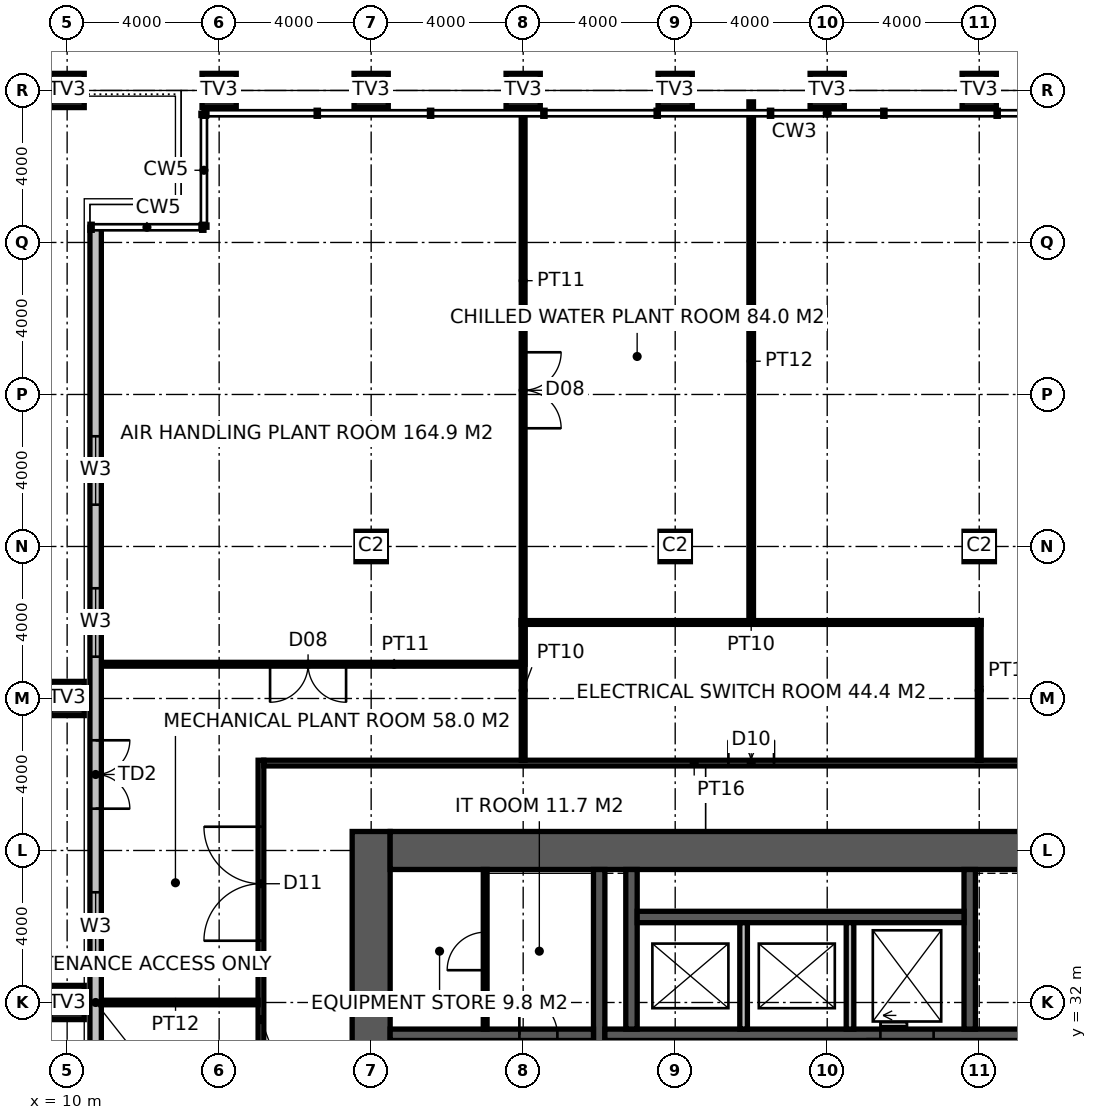
"""IFC4 building model, lengths in metres.
Left out: names, types, materials, properties, quantities, classifications, styles, units other than length and angle.
Written with IfcOpenShell. Run it as: python <this file> out.ifc"""

import sys

from ifc_helpers import new_model, si_unit, direction, frame, frame_2d, origin, origin_2d, place, context, subcontext, project, spatial, rectangle, hollow_rectangle, extrude, element, fill, save


model = new_model("IFC4")
c1 = context("Model", 3, precision=1e-05, world=origin(), true_north=direction((0.0, 1.0)))
c2 = subcontext(c1, "Body", "Model", "MODEL_VIEW")
j1 = project(units=[si_unit("LENGTHUNIT", "METRE"), si_unit("PLANEANGLEUNIT", "RADIAN")], contexts=[c1])
p1 = place(None, origin())
s1 = spatial("IfcSite", under=j1, at=p1, CompositionType="ELEMENT")
p2 = place(p1, origin())
s2 = spatial("IfcBuilding", under=s1, at=p2, CompositionType="ELEMENT")
p3 = place(p2, frame((0.0, 0.0, 203.8)))
s3 = spatial("IfcBuildingStorey", under=s2, at=p3, CompositionType="ELEMENT", Elevation=203.8)
for number, where, z_axis, x_axis in (
    (1, (10.0, 32.0, 0.0), (0.0, 0.0, 1.0), (1.0, 0.0, 0.0)),
    (2, (10.0, 40.0, 0.0), (0.0, 0.0, 1.0), (1.0, 0.0, 0.0)),
    (3, (10.0, 56.0, 0.0), (0.0, 0.0, 1.0), (1.0, 0.0, 0.0)),
    (4, (14.0, 56.0, 0.0), (0.0, 0.0, 1.0), (1.0, 0.0, 0.0)),
    (5, (18.0, 56.0, 0.0), (0.0, 0.0, 1.0), (1.0, 0.0, 0.0)),
    (6, (22.0, 56.0, 0.0), (0.0, 0.0, 1.0), (1.0, 0.0, 0.0)),
    (7, (26.0, 56.0, 0.0), (0.0, 0.0, 1.0), (1.0, 0.0, 0.0)),
    (8, (30.0, 56.0, 0.0), (0.0, 0.0, 1.0), (1.0, 0.0, 0.0)),
    (9, (34.0, 56.0, 0.0), (0.0, 0.0, 1.0), (1.0, 0.0, 0.0)),
):
    element("IfcColumn", number, at=place(p3, frame(where, z_axis=z_axis, x_axis=x_axis)), inside=s3, PredefinedType="USERDEFINED", context=c2, shape_type="SweptSolid", body=[
        extrude(hollow_rectangle(XDim=0.9, YDim=0.9, WallThickness=0.08, at=origin_2d()), origin(), (0.0, 0.0, 1.0), 5.4),
    ])
for number, where, z_axis, x_axis in (
    (10, (18.0, 44.0, 0.0), (0.0, 0.0, 1.0), (1.0, 0.0, 0.0)),
    (11, (26.0, 44.0, 0.0), (0.0, 0.0, 1.0), (1.0, 0.0, 0.0)),
    (12, (34.0, 44.0, 0.0), (0.0, 0.0, 1.0), (1.0, 0.0, 0.0)),
):
    element("IfcColumn", number, at=place(p3, frame(where, z_axis=z_axis, x_axis=x_axis)), inside=s3, PredefinedType="COLUMN", context=c2, shape_type="SweptSolid", body=[
        extrude(hollow_rectangle(XDim=0.8, YDim=0.8, WallThickness=0.08, at=origin_2d()), origin(), (0.0, 0.0, 1.0), 5.4),
    ])
p4 = place(p3, frame((18.0, 17.5, -0.15), z_axis=(0.0, 0.0, 1.0), x_axis=(0.0, 1.0, 0.0)))
e13 = element("IfcWall", 13, at=p4, inside=s3, PredefinedType="SHEAR", context=c2, shape_type="SweptSolid", body=[
    extrude(rectangle(XDim=19.0, YDim=1.0, at=frame_2d((9.5, 0.0))), origin(), (0.0, 0.0, 1.0), 5.4),
])
p5 = place(p3, frame((18.5, 36.0, -0.15), z_axis=(0.0, 0.0, 1.0), x_axis=(1.0, 0.0, 0.0)))
e14 = element("IfcWall", 14, at=p5, inside=s3, PredefinedType="SHEAR", context=c2, shape_type="SweptSolid", body=[
    extrude(rectangle(XDim=17.6, YDim=1.0, at=frame_2d((8.8, 0.0))), origin(), (0.0, 0.0, 1.0), 5.4),
])
p6 = place(p3, frame((24.0, 18.5, -0.15), z_axis=(0.0, 0.0, 1.0), x_axis=(0.0, 1.0, 0.0)))
e15 = element("IfcWall", 15, at=p6, inside=s3, PredefinedType="SHEAR", context=c2, shape_type="SweptSolid", body=[
    extrude(rectangle(XDim=17.0, YDim=0.3, at=frame_2d((8.5, 0.0))), origin(), (0.0, 0.0, 1.0), 5.4),
])
p7 = place(p6, frame((9.6, 0.0, 0.15)))
e16 = element("IfcOpeningElement", 16, at=p7, cuts=e15, PredefinedType="OPENING", context=c2, shape_type="SweptSolid", body=[
    extrude(rectangle(XDim=1.5, YDim=2.4, at=frame_2d((0.75, 1.2))), frame((0.0, 0.16, 0.0), z_axis=(0.0, -1.0, 0.0), x_axis=(1.0, 0.0, 0.0)), (0.0, 0.0, 1.0), 0.32),
])
p8 = place(p3, frame((24.15, 31.15, -0.15), z_axis=(0.0, 0.0, 1.0), x_axis=(1.0, 0.0, 0.0)))
e17 = element("IfcWall", 17, at=p8, inside=s3, PredefinedType="SHEAR", context=c2, shape_type="SweptSolid", body=[
    extrude(rectangle(XDim=11.25, YDim=0.3, at=frame_2d((5.625, 0.0))), origin(), (0.0, 0.0, 1.0), 5.4),
])
p9 = place(p8, frame((7.25, 0.0, 0.15)))
e18 = element("IfcOpeningElement", 18, at=p9, cuts=e17, PredefinedType="OPENING", context=c2, shape_type="SweptSolid", body=[
    extrude(rectangle(XDim=1.4, YDim=2.4, at=frame_2d((0.7, 1.2))), frame((0.0, 0.16, 0.0), z_axis=(0.0, -1.0, 0.0), x_axis=(1.0, 0.0, 0.0)), (0.0, 0.0, 1.0), 0.32),
])
p10 = place(p3, frame((18.5, 31.15, -0.15), z_axis=(0.0, 0.0, 1.0), x_axis=(1.0, 0.0, 0.0)))
e19 = element("IfcWall", 19, at=p10, inside=s3, PredefinedType="SHEAR", context=c2, shape_type="SweptSolid", body=[
    extrude(rectangle(XDim=5.35, YDim=0.3, at=frame_2d((2.675, 0.0))), origin(), (0.0, 0.0, 1.0), 5.4),
])
p11 = place(p10, frame((3.4, 0.0, 0.15)))
e20 = element("IfcOpeningElement", 20, at=p11, cuts=e19, PredefinedType="OPENING", context=c2, shape_type="SweptSolid", body=[
    extrude(rectangle(XDim=1.0, YDim=2.2, at=frame_2d((0.5, 1.1))), frame((0.0, 0.16, 0.0), z_axis=(0.0, -1.0, 0.0), x_axis=(1.0, 0.0, 0.0)), (0.0, 0.0, 1.0), 0.32),
])
for number, where, z_axis, x_axis in (
    (21, (24.85, 31.3, -0.15), (0.0, 0.0, 1.0), (0.0, 1.0, 0.0)),
    (22, (33.75, 31.3, -0.15), (0.0, 0.0, 1.0), (0.0, 1.0, 0.0)),
):
    element("IfcWall", number, at=place(p3, frame(where, z_axis=z_axis, x_axis=x_axis)), inside=s3, PredefinedType="SHEAR", context=c2, shape_type="SweptSolid", body=[
        extrude(rectangle(XDim=4.2, YDim=0.3, at=frame_2d((2.1, 0.0))), origin(), (0.0, 0.0, 1.0), 5.4),
    ])
p12 = place(p3, frame((25.0, 34.25, -0.15), z_axis=(0.0, 0.0, 1.0), x_axis=(1.0, 0.0, 0.0)))
e23 = element("IfcWall", 23, at=p12, inside=s3, PredefinedType="SHEAR", context=c2, shape_type="SweptSolid", body=[
    extrude(rectangle(XDim=8.6, YDim=0.3, at=frame_2d((4.3, 0.0))), origin(), (0.0, 0.0, 1.0), 5.4),
])
for number, where, z_axis, x_axis in (
    (24, (27.8, 31.3, -0.15), (0.0, 0.0, 1.0), (0.0, 1.0, 0.0)),
    (25, (30.6, 31.3, -0.15), (0.0, 0.0, 1.0), (0.0, 1.0, 0.0)),
):
    element("IfcWall", number, at=place(p3, frame(where, z_axis=z_axis, x_axis=x_axis)), inside=s3, PredefinedType="SOLIDWALL", context=c2, shape_type="SweptSolid", body=[
        extrude(rectangle(XDim=2.8, YDim=0.2, at=frame_2d((1.4, 0.0))), origin(), (0.0, 0.0, 1.0), 5.4),
    ])
p13 = place(p3, frame((21.0, 31.3, 0.0), z_axis=(0.0, 0.0, 1.0), x_axis=(0.0, 1.0, 0.0)))
e26 = element("IfcWall", 26, at=p13, inside=s3, PredefinedType="PARTITIONING", context=c2, shape_type="SweptSolid", body=[
    extrude(rectangle(XDim=4.2, YDim=0.1, at=frame_2d((2.1, 0.0))), origin(), (0.0, 0.0, 1.0), 5.25),
])
p14 = place(p13, frame((1.55, 0.0, 0.0)))
e27 = element("IfcOpeningElement", 27, at=p14, cuts=e26, PredefinedType="OPENING", context=c2, shape_type="SweptSolid", body=[
    extrude(rectangle(XDim=1.0, YDim=2.2, at=frame_2d((0.5, 1.1))), frame((0.0, 0.06, 0.0), z_axis=(0.0, -1.0, 0.0), x_axis=(1.0, 0.0, 0.0)), (0.0, 0.0, 1.0), 0.12),
])
p15 = place(p3, frame((15.1, 15.625, 0.0), z_axis=(0.0, 0.0, 1.0), x_axis=(0.0, 1.0, 0.0)))
e28 = element("IfcWall", 28, at=p15, inside=s3, PredefinedType="PARTITIONING", context=c2, shape_type="SweptSolid", body=[
    extrude(rectangle(XDim=22.75, YDim=0.15, at=frame_2d((11.375, 0.0))), origin(), (0.0, 0.0, 1.0), 5.25),
])
p16 = place(p15, frame((5.849, 0.0, 0.0)))
e29 = element("IfcOpeningElement", 29, at=p16, cuts=e28, PredefinedType="OPENING", context=c2, shape_type="SweptSolid", body=[
    extrude(rectangle(XDim=2.0, YDim=2.4, at=frame_2d((1.0, 1.2))), frame((0.0, 0.085, 0.0), z_axis=(0.0, -1.0, 0.0), x_axis=(1.0, 0.0, 0.0)), (0.0, 0.0, 1.0), 0.17),
])
p17 = place(p15, frame((18.0, 0.0, 0.0)))
e30 = element("IfcOpeningElement", 30, at=p17, cuts=e28, PredefinedType="OPENING", context=c2, shape_type="SweptSolid", body=[
    extrude(rectangle(XDim=3.0, YDim=3.3, at=frame_2d((1.5, 1.65))), frame((0.0, 0.085, 0.0), z_axis=(0.0, -1.0, 0.0), x_axis=(1.0, 0.0, 0.0)), (0.0, 0.0, 1.0), 0.17),
])
p18 = place(p3, frame((15.175, 38.3, 0.0), z_axis=(0.0, 0.0, 1.0), x_axis=(1.0, 0.0, 0.0)))
e31 = element("IfcWall", 31, at=p18, inside=s3, PredefinedType="PARTITIONING", context=c2, shape_type="SweptSolid", body=[
    extrude(rectangle(XDim=22.65, YDim=0.15, at=frame_2d((11.325, 0.0))), origin(), (0.0, 0.0, 1.0), 5.25),
])
p19 = place(p18, frame((12.225, 0.0, 0.0)))
e32 = element("IfcOpeningElement", 32, at=p19, cuts=e31, PredefinedType="OPENING", context=c2, shape_type="SweptSolid", body=[
    extrude(rectangle(XDim=1.2, YDim=2.2, at=frame_2d((0.6, 1.1))), frame((0.0, 0.085, 0.0), z_axis=(0.0, -1.0, 0.0), x_axis=(1.0, 0.0, 0.0)), (0.0, 0.0, 1.0), 0.17),
])
for number, where, z_axis, x_axis in (
    (33, (22.0, 38.375, 0.0), (0.0, 0.0, 1.0), (0.0, 1.0, 0.0)),
    (34, (34.0, 38.375, 0.0), (0.0, 0.0, 1.0), (0.0, 1.0, 0.0)),
):
    element("IfcWall", number, at=place(p3, frame(where, z_axis=z_axis, x_axis=x_axis)), inside=s3, PredefinedType="PARTITIONING", context=c2, shape_type="SweptSolid", body=[
        extrude(rectangle(XDim=3.675, YDim=0.1, at=frame_2d((1.837, 0.0))), origin(), (0.0, 0.0, 1.0), 4.25),
    ])
p20 = place(p3, frame((21.95, 42.0, 0.0), z_axis=(0.0, 0.0, 1.0), x_axis=(1.0, 0.0, 0.0)))
e35 = element("IfcWall", 35, at=p20, inside=s3, PredefinedType="PARTITIONING", context=c2, shape_type="SweptSolid", body=[
    extrude(rectangle(XDim=12.1, YDim=0.1, at=frame_2d((6.05, 0.0))), origin(), (0.0, 0.0, 1.0), 5.25),
])
p21 = place(p3, frame((28.0, 42.05, 0.0), z_axis=(0.0, 0.0, 1.0), x_axis=(0.0, 1.0, 0.0)))
e36 = element("IfcWall", 36, at=p21, inside=s3, PredefinedType="PARTITIONING", context=c2, shape_type="SweptSolid", body=[
    extrude(rectangle(XDim=13.65, YDim=0.12, at=frame_2d((6.825, 0.0))), origin(), (0.0, 0.0, 1.0), 5.25),
])
p22 = place(p3, frame((10.68, 32.0, 0.0), z_axis=(0.0, 0.0, 1.0), x_axis=(1.0, 0.0, 0.0)))
e37 = element("IfcWall", 37, at=p22, inside=s3, PredefinedType="PARTITIONING", context=c2, shape_type="SweptSolid", body=[
    extrude(rectangle(XDim=4.345, YDim=0.12, at=frame_2d((2.172, 0.0))), origin(), (0.0, 0.0, 1.0), 4.05),
])
p23 = place(p3, frame((22.0, 40.901, 0.0), z_axis=(0.0, 0.0, 1.0), x_axis=(-1.0, 0.0, 0.0)))
e38 = element("IfcWall", 38, at=p23, inside=s3, PredefinedType="PARTITIONING", context=c2, shape_type="SweptSolid", body=[
    extrude(rectangle(XDim=11.32, YDim=0.1, at=frame_2d((5.66, 0.0))), origin(), (0.0, 0.0, 1.0), 5.25),
])
p24 = place(p23, frame((4.66, 0.0, 0.0)))
e39 = element("IfcOpeningElement", 39, at=p24, cuts=e38, PredefinedType="OPENING", context=c2, shape_type="SweptSolid", body=[
    extrude(rectangle(XDim=2.0, YDim=2.4, at=frame_2d((1.0, 1.2))), frame((0.0, 0.06, 0.0), z_axis=(0.0, -1.0, 0.0), x_axis=(1.0, 0.0, 0.0)), (0.0, 0.0, 1.0), 0.12),
])
p25 = place(p3, frame((21.999, 55.32, 0.0), z_axis=(0.0, 0.0, 1.0), x_axis=(0.0, -1.0, 0.0)))
e40 = element("IfcWall", 40, at=p25, inside=s3, PredefinedType="PARTITIONING", context=c2, shape_type="SweptSolid", body=[
    extrude(rectangle(XDim=14.419, YDim=0.1, at=frame_2d((7.209, 0.0))), origin(), (0.0, 0.0, 1.0), 4.25),
])
p26 = place(p25, frame((6.209, 0.0, 0.0)))
e41 = element("IfcOpeningElement", 41, at=p26, cuts=e40, PredefinedType="OPENING", context=c2, shape_type="SweptSolid", body=[
    extrude(rectangle(XDim=2.0, YDim=2.4, at=frame_2d((1.0, 1.2))), frame((0.0, 0.06, 0.0), z_axis=(0.0, -1.0, 0.0), x_axis=(1.0, 0.0, 0.0)), (0.0, 0.0, 1.0), 0.12),
])
p27 = place(p3, frame((10.75, 52.4, 0.0), z_axis=(0.0, 0.0, 1.0), x_axis=(0.0, -1.0, 0.0)))
e42 = element("IfcWall", 42, at=p27, inside=s3, PredefinedType="ELEMENTEDWALL", context=c2, shape_type="SweptSolid", body=[
    extrude(rectangle(XDim=40.8, YDim=0.3, at=frame_2d((20.4, 0.0))), origin(), (0.0, 0.0, 1.0), 5.25),
])
p28 = place(p27, frame((33.5, 0.0, 0.8)))
e43 = element("IfcOpeningElement", 43, at=p28, cuts=e42, PredefinedType="OPENING", context=c2, shape_type="SweptSolid", body=[
    extrude(rectangle(XDim=1.8, YDim=2.4, at=frame_2d((0.9, 1.2))), frame((0.0, 0.16, 0.0), z_axis=(0.0, -1.0, 0.0), x_axis=(1.0, 0.0, 0.0)), (0.0, 0.0, 1.0), 0.32),
])
p29 = place(p27, frame((29.5, 0.0, 0.8)))
e44 = element("IfcOpeningElement", 44, at=p29, cuts=e42, PredefinedType="OPENING", context=c2, shape_type="SweptSolid", body=[
    extrude(rectangle(XDim=1.8, YDim=2.4, at=frame_2d((0.9, 1.2))), frame((0.0, 0.16, 0.0), z_axis=(0.0, -1.0, 0.0), x_axis=(1.0, 0.0, 0.0)), (0.0, 0.0, 1.0), 0.32),
])
p30 = place(p27, frame((25.5, 0.0, 0.8)))
e45 = element("IfcOpeningElement", 45, at=p30, cuts=e42, PredefinedType="OPENING", context=c2, shape_type="SweptSolid", body=[
    extrude(rectangle(XDim=1.8, YDim=2.4, at=frame_2d((0.9, 1.2))), frame((0.0, 0.16, 0.0), z_axis=(0.0, -1.0, 0.0), x_axis=(1.0, 0.0, 0.0)), (0.0, 0.0, 1.0), 0.32),
])
p31 = place(p27, frame((21.5, 0.0, 0.8)))
e46 = element("IfcOpeningElement", 46, at=p31, cuts=e42, PredefinedType="OPENING", context=c2, shape_type="SweptSolid", body=[
    extrude(rectangle(XDim=1.8, YDim=2.4, at=frame_2d((0.9, 1.2))), frame((0.0, 0.16, 0.0), z_axis=(0.0, -1.0, 0.0), x_axis=(1.0, 0.0, 0.0)), (0.0, 0.0, 1.0), 0.32),
])
p32 = place(p27, frame((17.5, 0.0, 0.8)))
e47 = element("IfcOpeningElement", 47, at=p32, cuts=e42, PredefinedType="OPENING", context=c2, shape_type="SweptSolid", body=[
    extrude(rectangle(XDim=1.8, YDim=2.4, at=frame_2d((0.9, 1.2))), frame((0.0, 0.16, 0.0), z_axis=(0.0, -1.0, 0.0), x_axis=(1.0, 0.0, 0.0)), (0.0, 0.0, 1.0), 0.32),
])
p33 = place(p27, frame((13.5, 0.0, 0.0)))
e48 = element("IfcOpeningElement", 48, at=p33, cuts=e42, PredefinedType="OPENING", context=c2, shape_type="SweptSolid", body=[
    extrude(rectangle(XDim=1.8, YDim=2.4, at=frame_2d((0.9, 1.2))), frame((0.0, 0.16, 0.0), z_axis=(0.0, -1.0, 0.0), x_axis=(1.0, 0.0, 0.0)), (0.0, 0.0, 1.0), 0.32),
])
p34 = place(p27, frame((9.5, 0.0, 0.8)))
e49 = element("IfcOpeningElement", 49, at=p34, cuts=e42, PredefinedType="OPENING", context=c2, shape_type="SweptSolid", body=[
    extrude(rectangle(XDim=1.8, YDim=2.4, at=frame_2d((0.9, 1.2))), frame((0.0, 0.16, 0.0), z_axis=(0.0, -1.0, 0.0), x_axis=(1.0, 0.0, 0.0)), (0.0, 0.0, 1.0), 0.32),
])
p35 = place(p27, frame((5.5, 0.0, 0.8)))
e50 = element("IfcOpeningElement", 50, at=p35, cuts=e42, PredefinedType="OPENING", context=c2, shape_type="SweptSolid", body=[
    extrude(rectangle(XDim=1.8, YDim=2.4, at=frame_2d((0.9, 1.2))), frame((0.0, 0.16, 0.0), z_axis=(0.0, -1.0, 0.0), x_axis=(1.0, 0.0, 0.0)), (0.0, 0.0, 1.0), 0.32),
])
p36 = place(p11, origin())
e51 = element("IfcDoor", 51, at=p36, inside=s3, OperationType="SINGLE_SWING_LEFT", PredefinedType="DOOR", context=c2, shape_type="SweptSolid", body=[
    extrude(rectangle(XDim=1.0, YDim=2.2, at=frame_2d((0.5, 1.1))), frame((0.0, 0.025, 0.0), z_axis=(0.0, -1.0, 0.0), x_axis=(1.0, 0.0, 0.0)), (0.0, 0.0, 1.0), 0.05),
])
fill(e20, e51)
p37 = place(p14, origin())
e52 = element("IfcDoor", 52, at=p37, inside=s3, OperationType="SINGLE_SWING_LEFT", PredefinedType="DOOR", context=c2, shape_type="SweptSolid", body=[
    extrude(rectangle(XDim=1.0, YDim=2.2, at=frame_2d((0.5, 1.1))), frame((0.0, 0.025, 0.0), z_axis=(0.0, -1.0, 0.0), x_axis=(1.0, 0.0, 0.0)), (0.0, 0.0, 1.0), 0.05),
])
fill(e27, e52)
p38 = place(p19, origin())
e53 = element("IfcDoor", 53, at=p38, inside=s3, OperationType="DOUBLE_DOOR_DOUBLE_SWING", PredefinedType="DOOR", context=c2, shape_type="SweptSolid", body=[
    extrude(rectangle(XDim=1.2, YDim=2.2, at=frame_2d((0.6, 1.1))), frame((0.0, 0.025, 0.0), z_axis=(0.0, -1.0, 0.0), x_axis=(1.0, 0.0, 0.0)), (0.0, 0.0, 1.0), 0.05),
])
fill(e32, e53)
p39 = place(p17, origin())
e54 = element("IfcDoor", 54, at=p39, inside=s3, OperationType="DOUBLE_DOOR_DOUBLE_SWING", PredefinedType="DOOR", context=c2, shape_type="SweptSolid", body=[
    extrude(rectangle(XDim=3.0, YDim=3.3, at=frame_2d((1.5, 1.65))), frame((0.0, 0.025, 0.0), z_axis=(0.0, -1.0, 0.0), x_axis=(1.0, 0.0, 0.0)), (0.0, 0.0, 1.0), 0.05),
])
fill(e30, e54)
p40 = place(p24, origin())
e55 = element("IfcDoor", 55, at=p40, inside=s3, OperationType="DOUBLE_DOOR_DOUBLE_SWING", PredefinedType="DOOR", context=c2, shape_type="SweptSolid", body=[
    extrude(rectangle(XDim=2.0, YDim=2.4, at=frame_2d((1.0, 1.2))), frame((0.0, 0.025, 0.0), z_axis=(0.0, -1.0, 0.0), x_axis=(1.0, 0.0, 0.0)), (0.0, 0.0, 1.0), 0.05),
])
fill(e39, e55)
p41 = place(p26, origin())
e56 = element("IfcDoor", 56, at=p41, inside=s3, OperationType="DOUBLE_DOOR_DOUBLE_SWING", PredefinedType="DOOR", context=c2, shape_type="SweptSolid", body=[
    extrude(rectangle(XDim=2.0, YDim=2.4, at=frame_2d((1.0, 1.2))), frame((0.0, 0.025, 0.0), z_axis=(0.0, -1.0, 0.0), x_axis=(1.0, 0.0, 0.0)), (0.0, 0.0, 1.0), 0.05),
])
fill(e41, e56)
p42 = place(p9, origin())
e57 = element("IfcDoor", 57, at=p42, inside=s3, OperationType="DOUBLE_DOOR_SLIDING", PredefinedType="DOOR", context=c2, shape_type="SweptSolid", body=[
    extrude(rectangle(XDim=1.4, YDim=2.4, at=frame_2d((0.7, 1.2))), frame((0.0, 0.025, 0.0), z_axis=(0.0, -1.0, 0.0), x_axis=(1.0, 0.0, 0.0)), (0.0, 0.0, 1.0), 0.05),
])
fill(e18, e57)
p43 = place(p32, origin())
e58 = element("IfcWindow", 58, at=p43, inside=s3, PartitioningType="SINGLE_PANEL", PredefinedType="WINDOW", context=c2, shape_type="SweptSolid", body=[
    extrude(rectangle(XDim=1.8, YDim=2.4, at=frame_2d((0.9, 1.2))), frame((0.0, 0.03, 0.0), z_axis=(0.0, -1.0, 0.0), x_axis=(1.0, 0.0, 0.0)), (0.0, 0.0, 1.0), 0.06),
])
fill(e47, e58)
p44 = place(p33, origin())
e59 = element("IfcDoor", 59, at=p44, inside=s3, OperationType="DOUBLE_DOOR_SINGLE_SWING", PredefinedType="DOOR", context=c2, shape_type="SweptSolid", body=[
    extrude(rectangle(XDim=1.8, YDim=2.4, at=frame_2d((0.9, 1.2))), frame((0.0, 0.025, 0.0), z_axis=(0.0, -1.0, 0.0), x_axis=(1.0, 0.0, 0.0)), (0.0, 0.0, 1.0), 0.05),
])
fill(e48, e59)
p45 = place(p34, origin())
e60 = element("IfcWindow", 60, at=p45, inside=s3, PartitioningType="SINGLE_PANEL", PredefinedType="WINDOW", context=c2, shape_type="SweptSolid", body=[
    extrude(rectangle(XDim=1.8, YDim=2.4, at=frame_2d((0.9, 1.2))), frame((0.0, 0.03, 0.0), z_axis=(0.0, -1.0, 0.0), x_axis=(1.0, 0.0, 0.0)), (0.0, 0.0, 1.0), 0.06),
])
fill(e49, e60)
p46 = place(p35, origin())
e61 = element("IfcWindow", 61, at=p46, inside=s3, PartitioningType="SINGLE_PANEL", PredefinedType="WINDOW", context=c2, shape_type="SweptSolid", body=[
    extrude(rectangle(XDim=1.8, YDim=2.4, at=frame_2d((0.9, 1.2))), frame((0.0, 0.03, 0.0), z_axis=(0.0, -1.0, 0.0), x_axis=(1.0, 0.0, 0.0)), (0.0, 0.0, 1.0), 0.06),
])
fill(e50, e61)
save(model, sys.argv[1])
